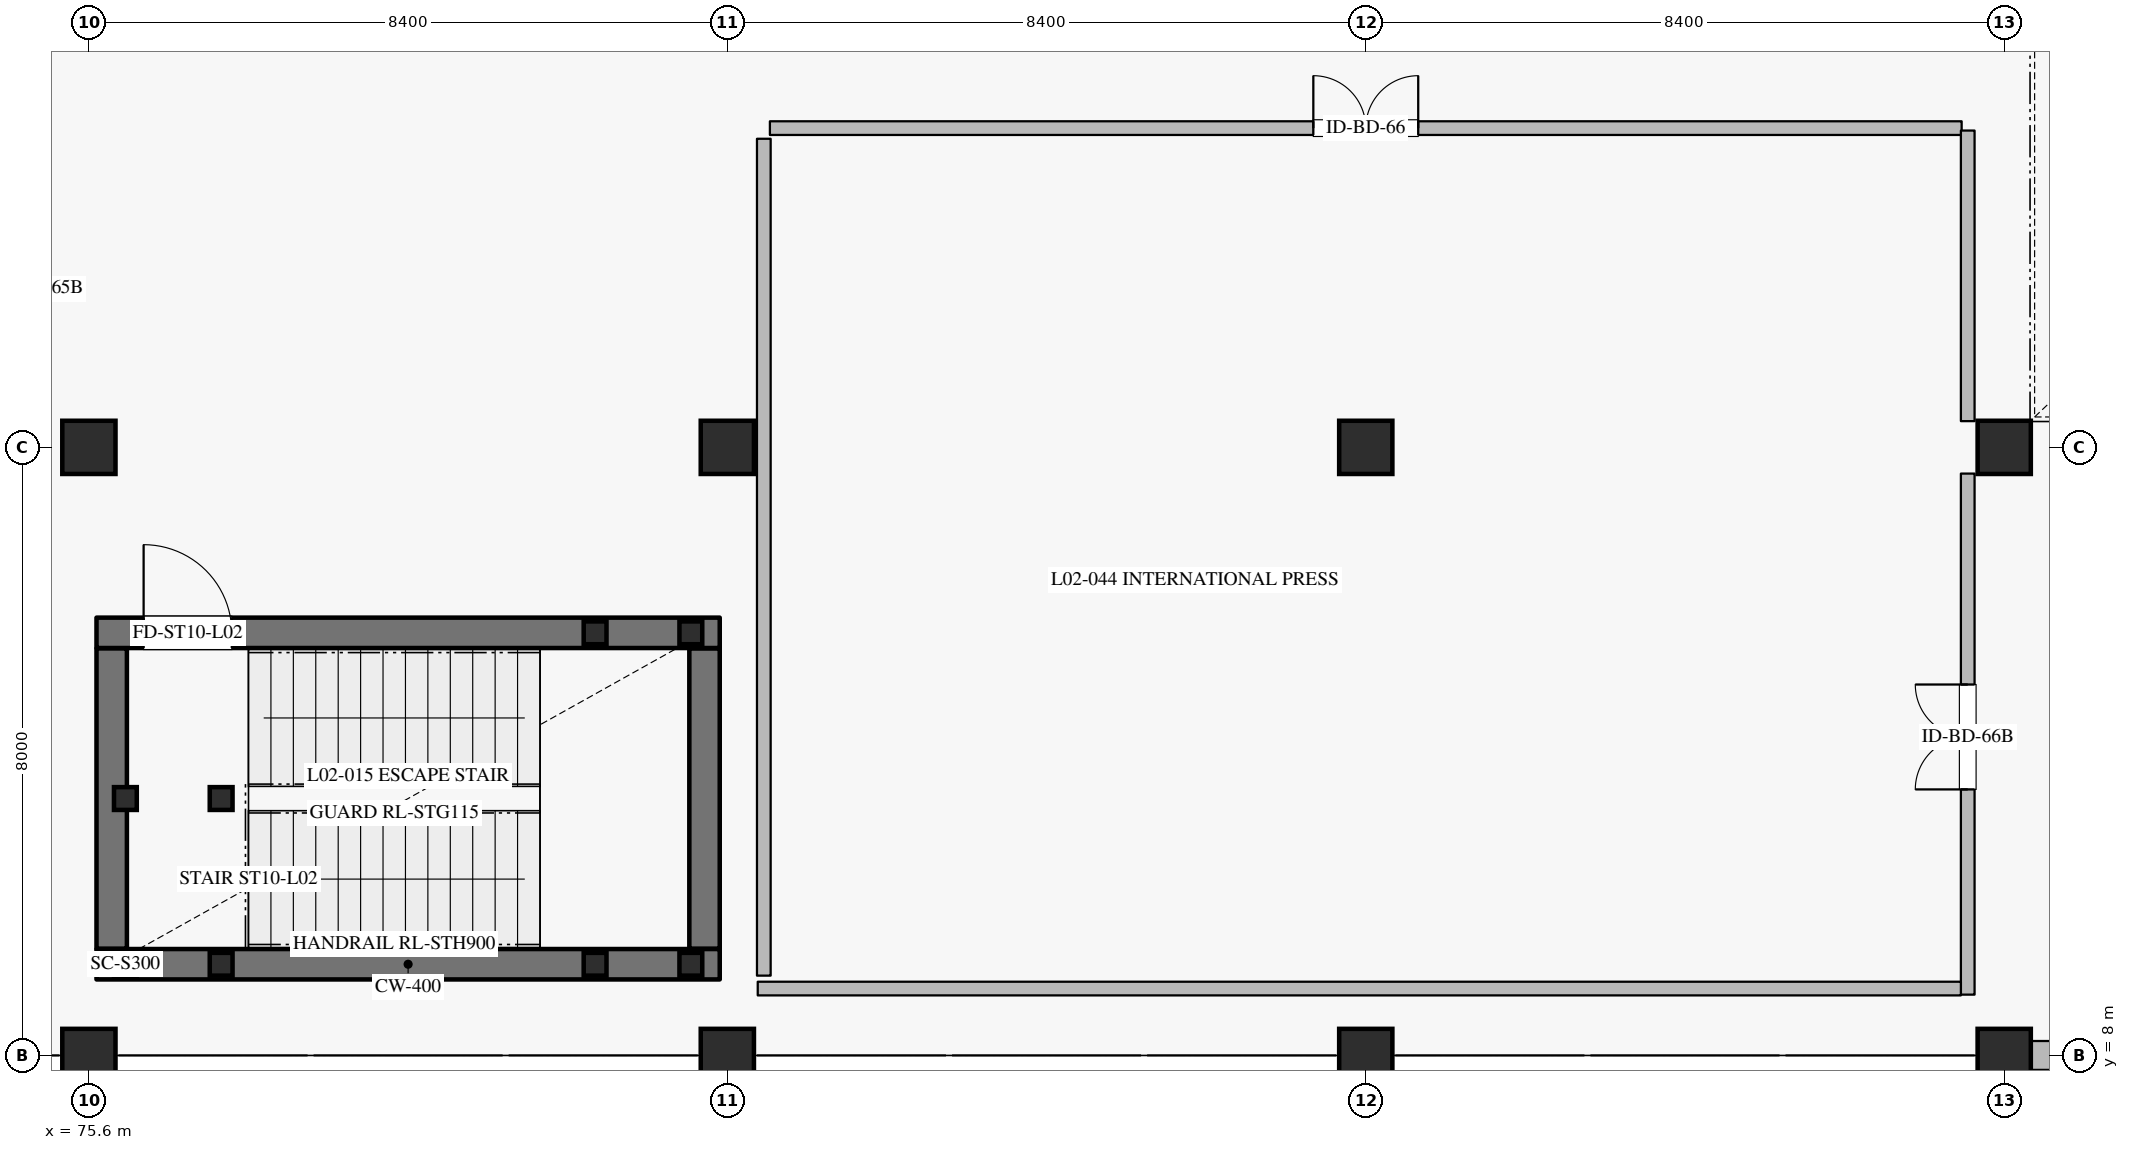
"""IFC4 building model, lengths in metres.
Left out: names, types, materials, properties, quantities, classifications, styles, units other than length and angle.
Written with IfcOpenShell. Run it as: python <this file> out.ifc"""

import sys

from ifc_helpers import new_model, si_unit, direction, frame, frame_2d, origin, origin_2d, place, context, subcontext, project, spatial, rectangle, hollow_rectangle, extrude, element, fill, save


model = new_model("IFC4")
c1 = context("Model", 3, precision=1e-05, world=origin(), true_north=direction((0.0, 1.0)))
c2 = subcontext(c1, "Body", "Model", "MODEL_VIEW")
j1 = project(units=[si_unit("LENGTHUNIT", "METRE"), si_unit("PLANEANGLEUNIT", "RADIAN")], contexts=[c1])
p1 = place(None, origin())
s1 = spatial("IfcSite", under=j1, at=p1, CompositionType="ELEMENT")
p2 = place(p1, origin())
s2 = spatial("IfcBuilding", under=s1, at=p2, CompositionType="ELEMENT")
p3 = place(p2, frame((0.0, 0.0, 11.4)))
s3 = spatial("IfcBuildingStorey", under=s2, at=p3, CompositionType="ELEMENT", Elevation=11.4)
for number, where, z_axis, x_axis in (
    (1, (75.6, 8.0, 0.0), (0.0, 0.0, 1.0), (1.0, 0.0, 0.0)),
    (2, (75.6, 16.0, 0.0), (0.0, 0.0, 1.0), (1.0, 0.0, 0.0)),
    (3, (84.0, 8.0, 0.0), (0.0, 0.0, 1.0), (1.0, 0.0, 0.0)),
    (4, (84.0, 16.0, 0.0), (0.0, 0.0, 1.0), (1.0, 0.0, 0.0)),
    (5, (92.4, 8.0, 0.0), (0.0, 0.0, 1.0), (1.0, 0.0, 0.0)),
    (6, (92.4, 16.0, 0.0), (0.0, 0.0, 1.0), (1.0, 0.0, 0.0)),
    (7, (100.8, 8.0, 0.0), (0.0, 0.0, 1.0), (1.0, 0.0, 0.0)),
    (8, (100.8, 16.0, 0.0), (0.0, 0.0, 1.0), (1.0, 0.0, 0.0)),
):
    element("IfcColumn", number, at=place(p3, frame(where, z_axis=z_axis, x_axis=x_axis)), inside=s3, PredefinedType="COLUMN", context=c2, shape_type="SweptSolid", body=[
        extrude(rectangle(XDim=0.7, YDim=0.7, at=origin_2d()), origin(), (0.0, 0.0, 1.0), 4.8),
    ])
p4 = place(p3, frame((108.85, 8.0, 0.0), z_axis=(0.0, 0.0, 1.0), x_axis=(-1.0, 0.0, 0.0)))
e9 = element("IfcWall", 9, at=p4, inside=s3, PredefinedType="SOLIDWALL", context=c2, shape_type="SweptSolid", body=[
    extrude(rectangle(XDim=7.7, YDim=0.38, at=frame_2d((3.85, 0.0))), origin(), (0.0, 0.0, 1.0), 3.85),
])
p5 = place(p4, frame((2.6, 0.0, 0.95)))
e10 = element("IfcOpeningElement", 10, at=p5, cuts=e9, PredefinedType="OPENING", context=c2, shape_type="SweptSolid", body=[
    extrude(rectangle(XDim=2.5, YDim=1.65, at=frame_2d((1.25, 0.825))), frame((0.0, 0.2, 0.0), z_axis=(0.0, -1.0, 0.0), x_axis=(1.0, 0.0, 0.0)), (0.0, 0.0, 1.0), 0.4),
])
p6 = place(p3, frame((75.7, 9.2, 0.0), z_axis=(0.0, 0.0, 1.0), x_axis=(1.0, 0.0, 0.0)))
e11 = element("IfcWall", 11, at=p6, inside=s3, PredefinedType="SHEAR", context=c2, shape_type="SweptSolid", body=[
    extrude(rectangle(XDim=8.2, YDim=0.4, at=frame_2d((4.1, 0.0))), origin(), (0.0, 0.0, 1.0), 4.535),
])
p7 = place(p3, frame((83.7, 9.405, 0.0), z_axis=(0.0, 0.0, 1.0), x_axis=(0.0, 1.0, 0.0)))
e12 = element("IfcWall", 12, at=p7, inside=s3, PredefinedType="SHEAR", context=c2, shape_type="SweptSolid", body=[
    extrude(rectangle(XDim=3.95, YDim=0.4, at=frame_2d((1.975, 0.0))), origin(), (0.0, 0.0, 1.0), 4.535),
])
p8 = place(p3, frame((75.7, 13.56, 0.0), z_axis=(0.0, 0.0, 1.0), x_axis=(1.0, 0.0, 0.0)))
e13 = element("IfcWall", 13, at=p8, inside=s3, PredefinedType="SHEAR", context=c2, shape_type="SweptSolid", body=[
    extrude(rectangle(XDim=8.2, YDim=0.4, at=frame_2d((4.1, 0.0))), origin(), (0.0, 0.0, 1.0), 4.535),
])
p9 = place(p8, frame((0.62, 0.0, 0.0)))
e14 = element("IfcOpeningElement", 14, at=p9, cuts=e13, PredefinedType="OPENING", context=c2, shape_type="SweptSolid", body=[
    extrude(rectangle(XDim=1.16, YDim=2.2, at=frame_2d((0.58, 1.1))), frame((0.0, 0.21, 0.0), z_axis=(0.0, -1.0, 0.0), x_axis=(1.0, 0.0, 0.0)), (0.0, 0.0, 1.0), 0.42),
])
p10 = place(p3, frame((75.9, 9.405, 0.0), z_axis=(0.0, 0.0, 1.0), x_axis=(0.0, 1.0, 0.0)))
e15 = element("IfcWall", 15, at=p10, inside=s3, PredefinedType="SHEAR", context=c2, shape_type="SweptSolid", body=[
    extrude(rectangle(XDim=3.95, YDim=0.4, at=frame_2d((1.975, 0.0))), origin(), (0.0, 0.0, 1.0), 4.535),
])
for number, where, z_axis, x_axis in (
    (16, (76.08, 9.2, 0.0), (0.0, 0.0, 1.0), (1.0, 0.0, 0.0)),
    (17, (76.08, 11.38, 0.0), (0.0, 0.0, 1.0), (1.0, 0.0, 0.0)),
    (18, (77.34, 9.2, 0.0), (0.0, 0.0, 1.0), (1.0, 0.0, 0.0)),
    (19, (77.34, 11.38, 0.0), (0.0, 0.0, 1.0), (1.0, 0.0, 0.0)),
):
    element("IfcColumn", number, at=place(p3, frame(where, z_axis=z_axis, x_axis=x_axis)), inside=s3, PredefinedType="COLUMN", context=c2, shape_type="SweptSolid", body=[
        extrude(hollow_rectangle(XDim=0.3, YDim=0.3, WallThickness=0.012, at=origin_2d()), origin(), (0.0, 0.0, 1.0), 4.62),
    ])
for number, where, z_axis, x_axis in (
    (20, (82.26, 9.2, -2.7), (0.0, 0.0, 1.0), (1.0, 0.0, 0.0)),
    (21, (82.26, 13.56, -2.7), (0.0, 0.0, 1.0), (1.0, 0.0, 0.0)),
    (22, (83.52, 9.2, -2.7), (0.0, 0.0, 1.0), (1.0, 0.0, 0.0)),
    (23, (83.52, 13.56, -2.7), (0.0, 0.0, 1.0), (1.0, 0.0, 0.0)),
):
    element("IfcColumn", number, at=place(p3, frame(where, z_axis=z_axis, x_axis=x_axis)), inside=s3, PredefinedType="COLUMN", context=c2, shape_type="SweptSolid", body=[
        extrude(hollow_rectangle(XDim=0.3, YDim=0.3, WallThickness=0.012, at=origin_2d()), origin(), (0.0, 0.0, 1.0), 4.92),
    ])
p11 = place(p3, frame((84.56, 20.2, 0.0), z_axis=(0.0, 0.0, 1.0), x_axis=(1.0, 0.0, 0.0)))
e24 = element("IfcWall", 24, at=p11, inside=s3, PredefinedType="PARTITIONING", context=c2, shape_type="SweptSolid", body=[
    extrude(rectangle(XDim=15.68, YDim=0.18, at=frame_2d((7.84, 0.0))), origin(), (0.0, 0.0, 1.0), 4.535),
])
p12 = place(p11, frame((7.15, 0.0, 0.0)))
e25 = element("IfcOpeningElement", 25, at=p12, cuts=e24, PredefinedType="OPENING", context=c2, shape_type="SweptSolid", body=[
    extrude(rectangle(XDim=1.38, YDim=2.3, at=frame_2d((0.69, 1.15))), frame((0.0, 0.1, 0.0), z_axis=(0.0, -1.0, 0.0), x_axis=(1.0, 0.0, 0.0)), (0.0, 0.0, 1.0), 0.2),
])
p13 = place(p3, frame((84.48, 9.05, 0.0), z_axis=(0.0, 0.0, 1.0), x_axis=(0.0, 1.0, 0.0)))
e26 = element("IfcWall", 26, at=p13, inside=s3, PredefinedType="PARTITIONING", context=c2, shape_type="SweptSolid", body=[
    extrude(rectangle(XDim=11.01, YDim=0.18, at=frame_2d((5.505, 0.0))), origin(), (0.0, 0.0, 1.0), 4.535),
])
p14 = place(p3, frame((100.32, 8.8, 0.0), z_axis=(0.0, 0.0, 1.0), x_axis=(0.0, 1.0, 0.0)))
e27 = element("IfcWall", 27, at=p14, inside=s3, PredefinedType="PARTITIONING", context=c2, shape_type="SweptSolid", body=[
    extrude(rectangle(XDim=6.855, YDim=0.18, at=frame_2d((3.427, 0.0))), origin(), (0.0, 0.0, 1.0), 4.535),
])
p15 = place(p14, frame((2.7, 0.0, 0.0)))
e28 = element("IfcOpeningElement", 28, at=p15, cuts=e27, PredefinedType="OPENING", context=c2, shape_type="SweptSolid", body=[
    extrude(rectangle(XDim=1.38, YDim=2.3, at=frame_2d((0.69, 1.15))), frame((0.0, 0.1, 0.0), z_axis=(0.0, -1.0, 0.0), x_axis=(1.0, 0.0, 0.0)), (0.0, 0.0, 1.0), 0.2),
])
p16 = place(p3, frame((100.32, 16.345, 0.0), z_axis=(0.0, 0.0, 1.0), x_axis=(0.0, 1.0, 0.0)))
e29 = element("IfcWall", 29, at=p16, inside=s3, PredefinedType="PARTITIONING", context=c2, shape_type="SweptSolid", body=[
    extrude(rectangle(XDim=3.823, YDim=0.18, at=frame_2d((1.912, 0.0))), origin(), (0.0, 0.0, 1.0), 4.535),
])
p17 = place(p3, frame((84.4, 8.88, 0.0), z_axis=(0.0, 0.0, 1.0), x_axis=(1.0, 0.0, 0.0)))
e30 = element("IfcWall", 30, at=p17, inside=s3, PredefinedType="PARTITIONING", context=c2, shape_type="SweptSolid", body=[
    extrude(rectangle(XDim=15.83, YDim=0.18, at=frame_2d((7.915, 0.0))), origin(), (0.0, 0.0, 1.0), 4.535),
])
p18 = place(p9, origin())
e31 = element("IfcDoor", 31, at=p18, inside=s3, OperationType="SINGLE_SWING_LEFT", PredefinedType="DOOR", context=c2, shape_type="SweptSolid", body=[
    extrude(rectangle(XDim=1.16, YDim=2.2, at=frame_2d((0.58, 1.1))), frame((0.0, 0.025, 0.0), z_axis=(0.0, -1.0, 0.0), x_axis=(1.0, 0.0, 0.0)), (0.0, 0.0, 1.0), 0.05),
])
fill(e14, e31)
p19 = place(p12, origin())
e32 = element("IfcDoor", 32, at=p19, inside=s3, OperationType="DOUBLE_DOOR_SINGLE_SWING", PredefinedType="DOOR", context=c2, shape_type="SweptSolid", body=[
    extrude(rectangle(XDim=1.38, YDim=2.3, at=frame_2d((0.69, 1.15))), frame((0.0, 0.025, 0.0), z_axis=(0.0, -1.0, 0.0), x_axis=(1.0, 0.0, 0.0)), (0.0, 0.0, 1.0), 0.05),
])
fill(e25, e32)
p20 = place(p15, origin())
e33 = element("IfcDoor", 33, at=p20, inside=s3, OperationType="DOUBLE_DOOR_SINGLE_SWING", PredefinedType="DOOR", context=c2, shape_type="SweptSolid", body=[
    extrude(rectangle(XDim=1.38, YDim=2.3, at=frame_2d((0.69, 1.15))), frame((0.0, 0.025, 0.0), z_axis=(0.0, -1.0, 0.0), x_axis=(1.0, 0.0, 0.0)), (0.0, 0.0, 1.0), 0.05),
])
fill(e28, e33)
save(model, sys.argv[1])
